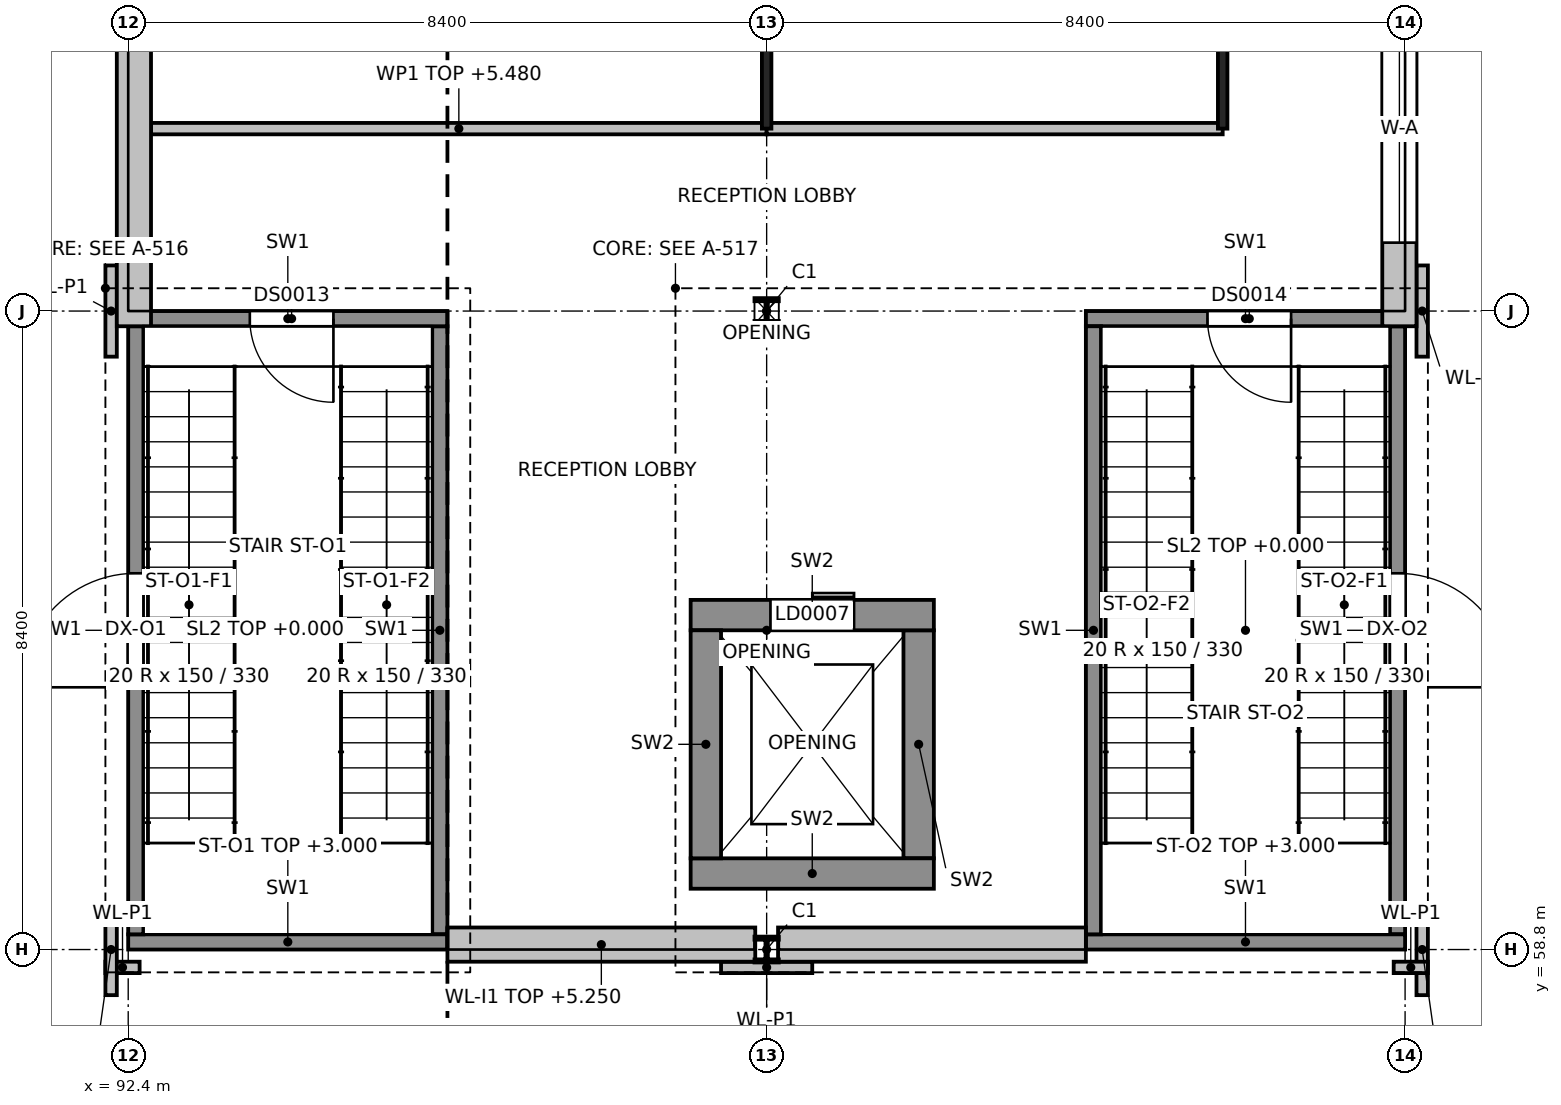
"""IFC4 building model, lengths in metres.
Left out: names, types, materials, properties, quantities, classifications, styles, units other than length and angle.
Written with IfcOpenShell. Run it as: python <this file> out.ifc"""

import sys

from ifc_helpers import new_model, si_unit, direction, frame, frame_2d, origin, origin_2d, place, context, subcontext, project, spatial, rectangle, i_section, extrude, element, fill, save


model = new_model("IFC4")
c1 = context("Model", 3, precision=1e-05, world=origin(), true_north=direction((0.0, 1.0)))
c2 = subcontext(c1, "Body", "Model", "MODEL_VIEW")
j1 = project(units=[si_unit("LENGTHUNIT", "METRE"), si_unit("PLANEANGLEUNIT", "RADIAN")], contexts=[c1])
p1 = place(None, origin())
s1 = spatial("IfcSite", under=j1, at=p1, CompositionType="ELEMENT")
p2 = place(p1, origin())
s2 = spatial("IfcBuilding", under=s1, at=p2, CompositionType="ELEMENT")
p3 = place(p2, origin())
s3 = spatial("IfcBuildingStorey", under=s2, at=p3, CompositionType="ELEMENT", Elevation=0.0)
for number, where, z_axis, x_axis in (
    (1, (100.8, 58.8, -1.35), (0.0, 0.0, 1.0), (1.0, 0.0, 0.0)),
    (2, (100.8, 67.2, -1.35), (0.0, 0.0, 1.0), (1.0, 0.0, 0.0)),
):
    element("IfcColumn", number, at=place(p3, frame(where, z_axis=z_axis, x_axis=x_axis)), inside=s3, PredefinedType="COLUMN", context=c2, shape_type="SweptSolid", body=[
        extrude(i_section(OverallWidth=0.3, OverallDepth=0.32, WebThickness=0.011, FlangeThickness=0.021, at=origin_2d()), origin(), (0.0, 0.0, 1.0), 7.35),
    ])
p4 = place(p3, frame((92.4, 58.9, -1.35), z_axis=(0.0, 0.0, 1.0), x_axis=(1.0, 0.0, 0.0)))
e3 = element("IfcWall", 3, at=p4, inside=s3, PredefinedType="SHEAR", context=c2, shape_type="SweptSolid", body=[
    extrude(rectangle(XDim=4.2, YDim=0.2, at=frame_2d((2.1, 0.0))), origin(), (0.0, 0.0, 1.0), 7.35),
])
p5 = place(p3, frame((92.4, 67.1, -1.35), z_axis=(0.0, 0.0, 1.0), x_axis=(1.0, 0.0, 0.0)))
e4 = element("IfcWall", 4, at=p5, inside=s3, PredefinedType="SHEAR", context=c2, shape_type="SweptSolid", body=[
    extrude(rectangle(XDim=4.2, YDim=0.2, at=frame_2d((2.1, 0.0))), origin(), (0.0, 0.0, 1.0), 7.35),
])
p6 = place(p5, frame((1.6, 0.0, 1.35)))
e5 = element("IfcOpeningElement", 5, at=p6, cuts=e4, PredefinedType="OPENING", context=c2, shape_type="SweptSolid", body=[
    extrude(rectangle(XDim=1.1, YDim=2.1, at=frame_2d((0.55, 1.05))), frame((0.0, 0.1, 0.0), z_axis=(0.0, -1.0, 0.0), x_axis=(1.0, 0.0, 0.0)), (0.0, 0.0, 1.0), 0.2),
])
p7 = place(p3, frame((92.5, 59.0, -1.35), z_axis=(0.0, 0.0, 1.0), x_axis=(0.0, 1.0, 0.0)))
e6 = element("IfcWall", 6, at=p7, inside=s3, PredefinedType="SHEAR", context=c2, shape_type="SweptSolid", body=[
    extrude(rectangle(XDim=8.0, YDim=0.2, at=frame_2d((4.0, 0.0))), origin(), (0.0, 0.0, 1.0), 7.35),
])
p8 = place(p7, frame((3.25, 0.0, 1.35)))
e7 = element("IfcOpeningElement", 7, at=p8, cuts=e6, PredefinedType="OPENING", context=c2, shape_type="SweptSolid", body=[
    extrude(rectangle(XDim=1.5, YDim=2.4, at=frame_2d((0.75, 1.2))), frame((0.0, 0.1, 0.0), z_axis=(0.0, -1.0, 0.0), x_axis=(1.0, 0.0, 0.0)), (0.0, 0.0, 1.0), 0.2),
])
p9 = place(p3, frame((96.5, 59.0, -1.35), z_axis=(0.0, 0.0, 1.0), x_axis=(0.0, 1.0, 0.0)))
e8 = element("IfcWall", 8, at=p9, inside=s3, PredefinedType="SHEAR", context=c2, shape_type="SweptSolid", body=[
    extrude(rectangle(XDim=8.0, YDim=0.2, at=frame_2d((4.0, 0.0))), origin(), (0.0, 0.0, 1.0), 7.35),
])
p10 = place(p3, frame((105.0, 58.9, -1.35), z_axis=(0.0, 0.0, 1.0), x_axis=(1.0, 0.0, 0.0)))
e9 = element("IfcWall", 9, at=p10, inside=s3, PredefinedType="SHEAR", context=c2, shape_type="SweptSolid", body=[
    extrude(rectangle(XDim=4.2, YDim=0.2, at=frame_2d((2.1, 0.0))), origin(), (0.0, 0.0, 1.0), 7.35),
])
p11 = place(p3, frame((105.0, 67.1, -1.35), z_axis=(0.0, 0.0, 1.0), x_axis=(1.0, 0.0, 0.0)))
e10 = element("IfcWall", 10, at=p11, inside=s3, PredefinedType="SHEAR", context=c2, shape_type="SweptSolid", body=[
    extrude(rectangle(XDim=4.2, YDim=0.2, at=frame_2d((2.1, 0.0))), origin(), (0.0, 0.0, 1.0), 7.35),
])
p12 = place(p11, frame((1.6, 0.0, 1.35)))
e11 = element("IfcOpeningElement", 11, at=p12, cuts=e10, PredefinedType="OPENING", context=c2, shape_type="SweptSolid", body=[
    extrude(rectangle(XDim=1.1, YDim=2.1, at=frame_2d((0.55, 1.05))), frame((0.0, 0.1, 0.0), z_axis=(0.0, -1.0, 0.0), x_axis=(1.0, 0.0, 0.0)), (0.0, 0.0, 1.0), 0.2),
])
p13 = place(p3, frame((105.1, 59.0, -1.35), z_axis=(0.0, 0.0, 1.0), x_axis=(0.0, 1.0, 0.0)))
e12 = element("IfcWall", 12, at=p13, inside=s3, PredefinedType="SHEAR", context=c2, shape_type="SweptSolid", body=[
    extrude(rectangle(XDim=8.0, YDim=0.2, at=frame_2d((4.0, 0.0))), origin(), (0.0, 0.0, 1.0), 7.35),
])
p14 = place(p3, frame((109.1, 59.0, -1.35), z_axis=(0.0, 0.0, 1.0), x_axis=(0.0, 1.0, 0.0)))
e13 = element("IfcWall", 13, at=p14, inside=s3, PredefinedType="SHEAR", context=c2, shape_type="SweptSolid", body=[
    extrude(rectangle(XDim=8.0, YDim=0.2, at=frame_2d((4.0, 0.0))), origin(), (0.0, 0.0, 1.0), 7.35),
])
p15 = place(p14, frame((3.25, 0.0, 1.35)))
e14 = element("IfcOpeningElement", 14, at=p15, cuts=e13, PredefinedType="OPENING", context=c2, shape_type="SweptSolid", body=[
    extrude(rectangle(XDim=1.5, YDim=2.4, at=frame_2d((0.75, 1.2))), frame((0.0, 0.1, 0.0), z_axis=(0.0, -1.0, 0.0), x_axis=(1.0, 0.0, 0.0)), (0.0, 0.0, 1.0), 0.2),
])
p16 = place(p3, frame((99.8, 59.8, -1.35), z_axis=(0.0, 0.0, 1.0), x_axis=(1.0, 0.0, 0.0)))
e15 = element("IfcWall", 15, at=p16, inside=s3, PredefinedType="SHEAR", context=c2, shape_type="SweptSolid", body=[
    extrude(rectangle(XDim=3.2, YDim=0.4, at=frame_2d((1.6, 0.0))), origin(), (0.0, 0.0, 1.0), 7.35),
])
p17 = place(p3, frame((99.8, 63.2, -1.35), z_axis=(0.0, 0.0, 1.0), x_axis=(1.0, 0.0, 0.0)))
e16 = element("IfcWall", 16, at=p17, inside=s3, PredefinedType="SHEAR", context=c2, shape_type="SweptSolid", body=[
    extrude(rectangle(XDim=3.2, YDim=0.4, at=frame_2d((1.6, 0.0))), origin(), (0.0, 0.0, 1.0), 7.35),
])
p18 = place(p17, frame((1.05, 0.0, 1.35)))
e17 = element("IfcOpeningElement", 17, at=p18, cuts=e16, PredefinedType="OPENING", context=c2, shape_type="SweptSolid", body=[
    extrude(rectangle(XDim=1.1, YDim=2.1, at=frame_2d((0.55, 1.05))), frame((0.0, 0.2, 0.0), z_axis=(0.0, -1.0, 0.0), x_axis=(1.0, 0.0, 0.0)), (0.0, 0.0, 1.0), 0.4),
])
for number, where, z_axis, x_axis in (
    (18, (100.0, 60.0, -1.35), (0.0, 0.0, 1.0), (0.0, 1.0, 0.0)),
    (19, (102.8, 60.0, -1.35), (0.0, 0.0, 1.0), (0.0, 1.0, 0.0)),
):
    element("IfcWall", number, at=place(p3, frame(where, z_axis=z_axis, x_axis=x_axis)), inside=s3, PredefinedType="SHEAR", context=c2, shape_type="SweptSolid", body=[
        extrude(rectangle(XDim=3.0, YDim=0.4, at=frame_2d((1.5, 0.0))), origin(), (0.0, 0.0, 1.0), 7.35),
    ])
p19 = place(p3, frame((96.6, 58.865, 0.0), z_axis=(0.0, 0.0, 1.0), x_axis=(1.0, 0.0, 0.0)))
e20 = element("IfcWall", 20, at=p19, inside=s3, PredefinedType="SOLIDWALL", context=c2, shape_type="SweptSolid", body=[
    extrude(rectangle(XDim=4.05, YDim=0.45, at=frame_2d((2.025, 0.0))), origin(), (0.0, 0.0, 1.0), 5.25),
])
p20 = place(p3, frame((100.95, 58.865, 0.0), z_axis=(0.0, 0.0, 1.0), x_axis=(1.0, 0.0, 0.0)))
e21 = element("IfcWall", 21, at=p20, inside=s3, PredefinedType="SOLIDWALL", context=c2, shape_type="SweptSolid", body=[
    extrude(rectangle(XDim=4.05, YDim=0.45, at=frame_2d((2.025, 0.0))), origin(), (0.0, 0.0, 1.0), 5.25),
])
p21 = place(p3, frame((92.1, 58.565, 0.0), z_axis=(0.0, 0.0, 1.0), x_axis=(1.0, 0.0, 0.0)))
e22 = element("IfcWall", 22, at=p21, inside=s3, PredefinedType="SOLIDWALL", context=c2, shape_type="SweptSolid", body=[
    extrude(rectangle(XDim=0.45, YDim=0.15, at=frame_2d((0.225, 0.0))), origin(), (0.0, 0.0, 1.0), 6.0),
])
p22 = place(p3, frame((100.2, 58.565, 0.0), z_axis=(0.0, 0.0, 1.0), x_axis=(1.0, 0.0, 0.0)))
e23 = element("IfcWall", 23, at=p22, inside=s3, PredefinedType="SOLIDWALL", context=c2, shape_type="SweptSolid", body=[
    extrude(rectangle(XDim=1.2, YDim=0.15, at=frame_2d((0.6, 0.0))), origin(), (0.0, 0.0, 1.0), 6.0),
])
p23 = place(p3, frame((109.05, 58.565, 0.0), z_axis=(0.0, 0.0, 1.0), x_axis=(1.0, 0.0, 0.0)))
e24 = element("IfcWall", 24, at=p23, inside=s3, PredefinedType="SOLIDWALL", context=c2, shape_type="SweptSolid", body=[
    extrude(rectangle(XDim=0.45, YDim=0.15, at=frame_2d((0.225, 0.0))), origin(), (0.0, 0.0, 1.0), 6.0),
])
p24 = place(p3, frame((92.475, 67.0, 0.0), z_axis=(0.0, 0.0, 1.0), x_axis=(0.0, 1.0, 0.0)))
e25 = element("IfcWall", 25, at=p24, inside=s3, PredefinedType="SOLIDWALL", context=c2, shape_type="SweptSolid", body=[
    extrude(rectangle(XDim=8.44, YDim=0.45, at=frame_2d((4.22, 0.0))), origin(), (0.0, 0.0, 1.0), 5.25),
])
p25 = place(p24, frame((4.038, 0.0, 0.9)))
e26 = element("IfcOpeningElement", 26, at=p25, cuts=e25, PredefinedType="OPENING", context=c2, shape_type="SweptSolid", body=[
    extrude(rectangle(XDim=3.0, YDim=3.6, at=frame_2d((1.5, 1.8))), frame((0.0, 0.225, 0.0), z_axis=(0.0, -1.0, 0.0), x_axis=(1.0, 0.0, 0.0)), (0.0, 0.0, 1.0), 0.45),
])
for number, where, z_axis, x_axis in (
    (27, (92.175, 58.2, 0.0), (0.0, 0.0, 1.0), (0.0, 1.0, 0.0)),
    (28, (92.175, 66.6, 0.0), (0.0, 0.0, 1.0), (0.0, 1.0, 0.0)),
):
    element("IfcWall", number, at=place(p3, frame(where, z_axis=z_axis, x_axis=x_axis)), inside=s3, PredefinedType="SOLIDWALL", context=c2, shape_type="SweptSolid", body=[
        extrude(rectangle(XDim=1.2, YDim=0.15, at=frame_2d((0.6, 0.0))), origin(), (0.0, 0.0, 1.0), 6.0),
    ])
p26 = place(p3, frame((109.125, 67.0, 0.0), z_axis=(0.0, 0.0, 1.0), x_axis=(0.0, 1.0, 0.0)))
e29 = element("IfcWall", 29, at=p26, inside=s3, PredefinedType="SOLIDWALL", context=c2, shape_type="SweptSolid", body=[
    extrude(rectangle(XDim=8.44, YDim=0.45, at=frame_2d((4.22, 0.0))), origin(), (0.0, 0.0, 1.0), 5.25),
])
p27 = place(p26, frame((1.1, 0.0, 0.9)))
e30 = element("IfcOpeningElement", 30, at=p27, cuts=e29, PredefinedType="OPENING", context=c2, shape_type="SweptSolid", body=[
    extrude(rectangle(XDim=3.0, YDim=3.6, at=frame_2d((1.5, 1.8))), frame((0.0, 0.225, 0.0), z_axis=(0.0, -1.0, 0.0), x_axis=(1.0, 0.0, 0.0)), (0.0, 0.0, 1.0), 0.45),
])
p28 = place(p26, frame((4.7, 0.0, 0.9)))
e31 = element("IfcOpeningElement", 31, at=p28, cuts=e29, PredefinedType="OPENING", context=c2, shape_type="SweptSolid", body=[
    extrude(rectangle(XDim=3.0, YDim=3.6, at=frame_2d((1.5, 1.8))), frame((0.0, 0.225, 0.0), z_axis=(0.0, -1.0, 0.0), x_axis=(1.0, 0.0, 0.0)), (0.0, 0.0, 1.0), 0.45),
])
for number, where, z_axis, x_axis in (
    (32, (109.425, 58.2, 0.0), (0.0, 0.0, 1.0), (0.0, 1.0, 0.0)),
    (33, (109.425, 66.6, 0.0), (0.0, 0.0, 1.0), (0.0, 1.0, 0.0)),
):
    element("IfcWall", number, at=place(p3, frame(where, z_axis=z_axis, x_axis=x_axis)), inside=s3, PredefinedType="SOLIDWALL", context=c2, shape_type="SweptSolid", body=[
        extrude(rectangle(XDim=1.2, YDim=0.15, at=frame_2d((0.6, 0.0))), origin(), (0.0, 0.0, 1.0), 6.0),
    ])
p29 = place(p3, frame((92.7, 69.6, 0.0), z_axis=(0.0, 0.0, 1.0), x_axis=(1.0, 0.0, 0.0)))
e34 = element("IfcWall", 34, at=p29, inside=s3, PredefinedType="PARTITIONING", context=c2, shape_type="SweptSolid", body=[
    extrude(rectangle(XDim=8.1, YDim=0.15, at=frame_2d((4.05, 0.0))), origin(), (0.0, 0.0, 1.0), 5.48),
])
p30 = place(p3, frame((100.8, 69.6, 0.0), z_axis=(0.0, 0.0, 1.0), x_axis=(1.0, 0.0, 0.0)))
e35 = element("IfcWall", 35, at=p30, inside=s3, PredefinedType="PARTITIONING", context=c2, shape_type="SweptSolid", body=[
    extrude(rectangle(XDim=6.0, YDim=0.15, at=frame_2d((3.0, 0.0))), origin(), (0.0, 0.0, 1.0), 5.48),
])
p31 = place(p3, frame((100.8, 69.6, 0.0), z_axis=(0.0, 0.0, 1.0), x_axis=(0.0, 1.0, 0.0)))
e36 = element("IfcWall", 36, at=p31, inside=s3, PredefinedType="PARTITIONING", context=c2, shape_type="SweptSolid", body=[
    extrude(rectangle(XDim=5.84, YDim=0.125, at=frame_2d((2.92, 0.0))), origin(), (0.0, 0.0, 1.0), 5.48),
])
p32 = place(p3, frame((106.8, 69.6, 0.0), z_axis=(0.0, 0.0, 1.0), x_axis=(0.0, 1.0, 0.0)))
e37 = element("IfcWall", 37, at=p32, inside=s3, PredefinedType="PARTITIONING", context=c2, shape_type="SweptSolid", body=[
    extrude(rectangle(XDim=10.2, YDim=0.125, at=frame_2d((5.1, 0.0))), origin(), (0.0, 0.0, 1.0), 5.51),
])
p33 = place(p32, frame((4.15, 0.0, 0.0)))
e38 = element("IfcOpeningElement", 38, at=p33, cuts=e37, PredefinedType="OPENING", context=c2, shape_type="SweptSolid", body=[
    extrude(rectangle(XDim=1.8, YDim=2.1, at=frame_2d((0.9, 1.05))), frame((0.0, 0.062, 0.0), z_axis=(0.0, -1.0, 0.0), x_axis=(1.0, 0.0, 0.0)), (0.0, 0.0, 1.0), 0.125),
])
p34 = place(p8, origin())
e39 = element("IfcDoor", 39, at=p34, inside=s3, OperationType="DOUBLE_DOOR_SINGLE_SWING", PredefinedType="DOOR", context=c2, shape_type="SweptSolid", body=[
    extrude(rectangle(XDim=1.5, YDim=2.4, at=frame_2d((0.75, 1.2))), frame((0.0, 0.025, 0.0), z_axis=(0.0, -1.0, 0.0), x_axis=(1.0, 0.0, 0.0)), (0.0, 0.0, 1.0), 0.05),
])
fill(e7, e39)
p35 = place(p15, frame((1.5, 0.05, 0.0), z_axis=(0.0, 0.0, 1.0), x_axis=(-1.0, 0.0, 0.0)))
e40 = element("IfcDoor", 40, at=p35, inside=s3, OperationType="DOUBLE_DOOR_SINGLE_SWING", PredefinedType="DOOR", context=c2, shape_type="SweptSolid", body=[
    extrude(rectangle(XDim=1.5, YDim=2.4, at=frame_2d((0.75, 1.2))), frame((0.0, 0.025, 0.0), z_axis=(0.0, -1.0, 0.0), x_axis=(1.0, 0.0, 0.0)), (0.0, 0.0, 1.0), 0.05),
])
fill(e14, e40)
p36 = place(p27, origin())
e41 = element("IfcWindow", 41, at=p36, inside=s3, PartitioningType="SINGLE_PANEL", PredefinedType="WINDOW", context=c2, shape_type="SweptSolid", body=[
    extrude(rectangle(XDim=3.0, YDim=3.6, at=frame_2d((1.5, 1.8))), frame((0.0, 0.03, 0.0), z_axis=(0.0, -1.0, 0.0), x_axis=(1.0, 0.0, 0.0)), (0.0, 0.0, 1.0), 0.06),
])
fill(e30, e41)
p37 = place(p6, origin())
e42 = element("IfcDoor", 42, at=p37, inside=s3, OperationType="SINGLE_SWING_RIGHT", PredefinedType="DOOR", context=c2, shape_type="SweptSolid", body=[
    extrude(rectangle(XDim=1.1, YDim=2.1, at=frame_2d((0.55, 1.05))), frame((0.0, 0.025, 0.0), z_axis=(0.0, -1.0, 0.0), x_axis=(1.0, 0.0, 0.0)), (0.0, 0.0, 1.0), 0.05),
])
fill(e5, e42)
p38 = place(p12, origin())
e43 = element("IfcDoor", 43, at=p38, inside=s3, OperationType="SINGLE_SWING_RIGHT", PredefinedType="DOOR", context=c2, shape_type="SweptSolid", body=[
    extrude(rectangle(XDim=1.1, YDim=2.1, at=frame_2d((0.55, 1.05))), frame((0.0, 0.025, 0.0), z_axis=(0.0, -1.0, 0.0), x_axis=(1.0, 0.0, 0.0)), (0.0, 0.0, 1.0), 0.05),
])
fill(e11, e43)
p39 = place(p18, origin())
e44 = element("IfcDoor", 44, at=p39, inside=s3, OperationType="SLIDING_TO_LEFT", PredefinedType="DOOR", context=c2, shape_type="SweptSolid", body=[
    extrude(rectangle(XDim=1.1, YDim=2.1, at=frame_2d((0.55, 1.05))), frame((0.0, 0.025, 0.0), z_axis=(0.0, -1.0, 0.0), x_axis=(1.0, 0.0, 0.0)), (0.0, 0.0, 1.0), 0.05),
])
fill(e17, e44)
save(model, sys.argv[1])
